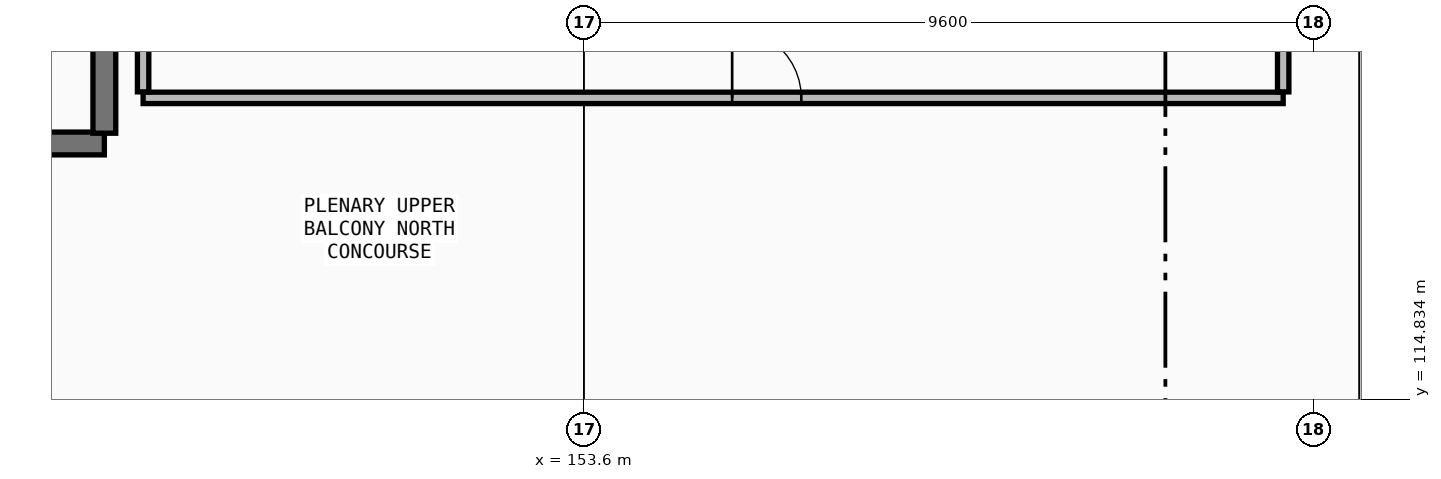
"""IFC4 building model, lengths in metres.
Left out: names, types, materials, properties, quantities, classifications, styles, units other than length and angle.
Written with IfcOpenShell. Run it as: python <this file> out.ifc"""

import sys

from ifc_helpers import new_model, si_unit, direction, frame, frame_2d, origin, place, context, subcontext, project, spatial, rectangle, extrude, element, fill, save


model = new_model("IFC4")
c1 = context("Model", 3, precision=1e-05, world=origin(), true_north=direction((0.0, 1.0)))
c2 = subcontext(c1, "Body", "Model", "MODEL_VIEW")
j1 = project(units=[si_unit("LENGTHUNIT", "METRE"), si_unit("PLANEANGLEUNIT", "RADIAN")], contexts=[c1])
p1 = place(None, origin())
s1 = spatial("IfcSite", under=j1, at=p1, CompositionType="ELEMENT")
p2 = place(p1, origin())
s2 = spatial("IfcBuilding", under=s1, at=p2, CompositionType="ELEMENT")
p3 = place(p2, frame((0.0, 0.0, 11.4)))
s3 = spatial("IfcBuildingStorey", under=s2, at=p3, CompositionType="ELEMENT", Elevation=11.4)
p4 = place(p3, frame((136.25, 118.2, 0.0), z_axis=(0.0, 0.0, 1.0), x_axis=(1.0, 0.0, 0.0)))
e1 = element("IfcWall", 1, at=p4, inside=s3, PredefinedType="SHEAR", context=c2, shape_type="SweptSolid", body=[
    extrude(rectangle(XDim=11.04, YDim=0.3, at=frame_2d((5.52, 0.0))), origin(), (0.0, 0.0, 1.0), 4.255),
])
p5 = place(p4, frame((1.312, 0.0, 0.0)))
e2 = element("IfcOpeningElement", 2, at=p5, cuts=e1, PredefinedType="OPENING", context=c2, shape_type="SweptSolid", body=[
    extrude(rectangle(XDim=0.91, YDim=2.08, at=frame_2d((0.455, 1.04))), frame((0.0, 0.16, 0.0), z_axis=(0.0, -1.0, 0.0), x_axis=(1.0, 0.0, 0.0)), (0.0, 0.0, 1.0), 0.32),
])
p6 = place(p3, frame((147.29, 118.335, 0.0), z_axis=(0.0, 0.0, 1.0), x_axis=(0.0, 1.0, 0.0)))
e3 = element("IfcWall", 3, at=p6, inside=s3, PredefinedType="SHEAR", context=c2, shape_type="SweptSolid", body=[
    extrude(rectangle(XDim=5.325, YDim=0.3, at=frame_2d((2.663, 0.0))), origin(), (0.0, 0.0, 1.0), 4.255),
])
p7 = place(p3, frame((147.8, 118.8, 0.0), z_axis=(0.0, 0.0, 1.0), x_axis=(1.0, 0.0, 0.0)))
e4 = element("IfcWall", 4, at=p7, inside=s3, PredefinedType="PARTITIONING", context=c2, shape_type="SweptSolid", body=[
    extrude(rectangle(XDim=15.0, YDim=0.15, at=frame_2d((7.5, 0.0))), origin(), (0.0, 0.0, 1.0), 4.5),
])
p8 = place(p7, frame((7.75, 0.0, 0.0)))
e5 = element("IfcOpeningElement", 5, at=p8, cuts=e4, PredefinedType="OPENING", context=c2, shape_type="SweptSolid", body=[
    extrude(rectangle(XDim=0.91, YDim=2.08, at=frame_2d((0.455, 1.04))), frame((0.0, 0.085, 0.0), z_axis=(0.0, -1.0, 0.0), x_axis=(1.0, 0.0, 0.0)), (0.0, 0.0, 1.0), 0.17),
])
for number, where, z_axis, x_axis in (
    (6, (162.8, 118.879, 0.0), (0.0, 0.0, 1.0), (0.0, 1.0, 0.0)),
    (7, (147.8, 125.78, 0.0), (0.0, 0.0, 1.0), (0.0, -1.0, 0.0)),
):
    element("IfcWall", number, at=place(p3, frame(where, z_axis=z_axis, x_axis=x_axis)), inside=s3, PredefinedType="PARTITIONING", context=c2, shape_type="SweptSolid", body=[
        extrude(rectangle(XDim=6.901, YDim=0.15, at=frame_2d((3.451, 0.0))), origin(), (0.0, 0.0, 1.0), 4.5),
    ])
p9 = place(p8, origin())
e8 = element("IfcDoor", 8, at=p9, inside=s3, OperationType="SINGLE_SWING_RIGHT", PredefinedType="DOOR", context=c2, shape_type="SweptSolid", body=[
    extrude(rectangle(XDim=0.91, YDim=2.08, at=frame_2d((0.455, 1.04))), frame((0.0, 0.025, 0.0), z_axis=(0.0, -1.0, 0.0), x_axis=(1.0, 0.0, 0.0)), (0.0, 0.0, 1.0), 0.05),
])
fill(e5, e8)
save(model, sys.argv[1])
